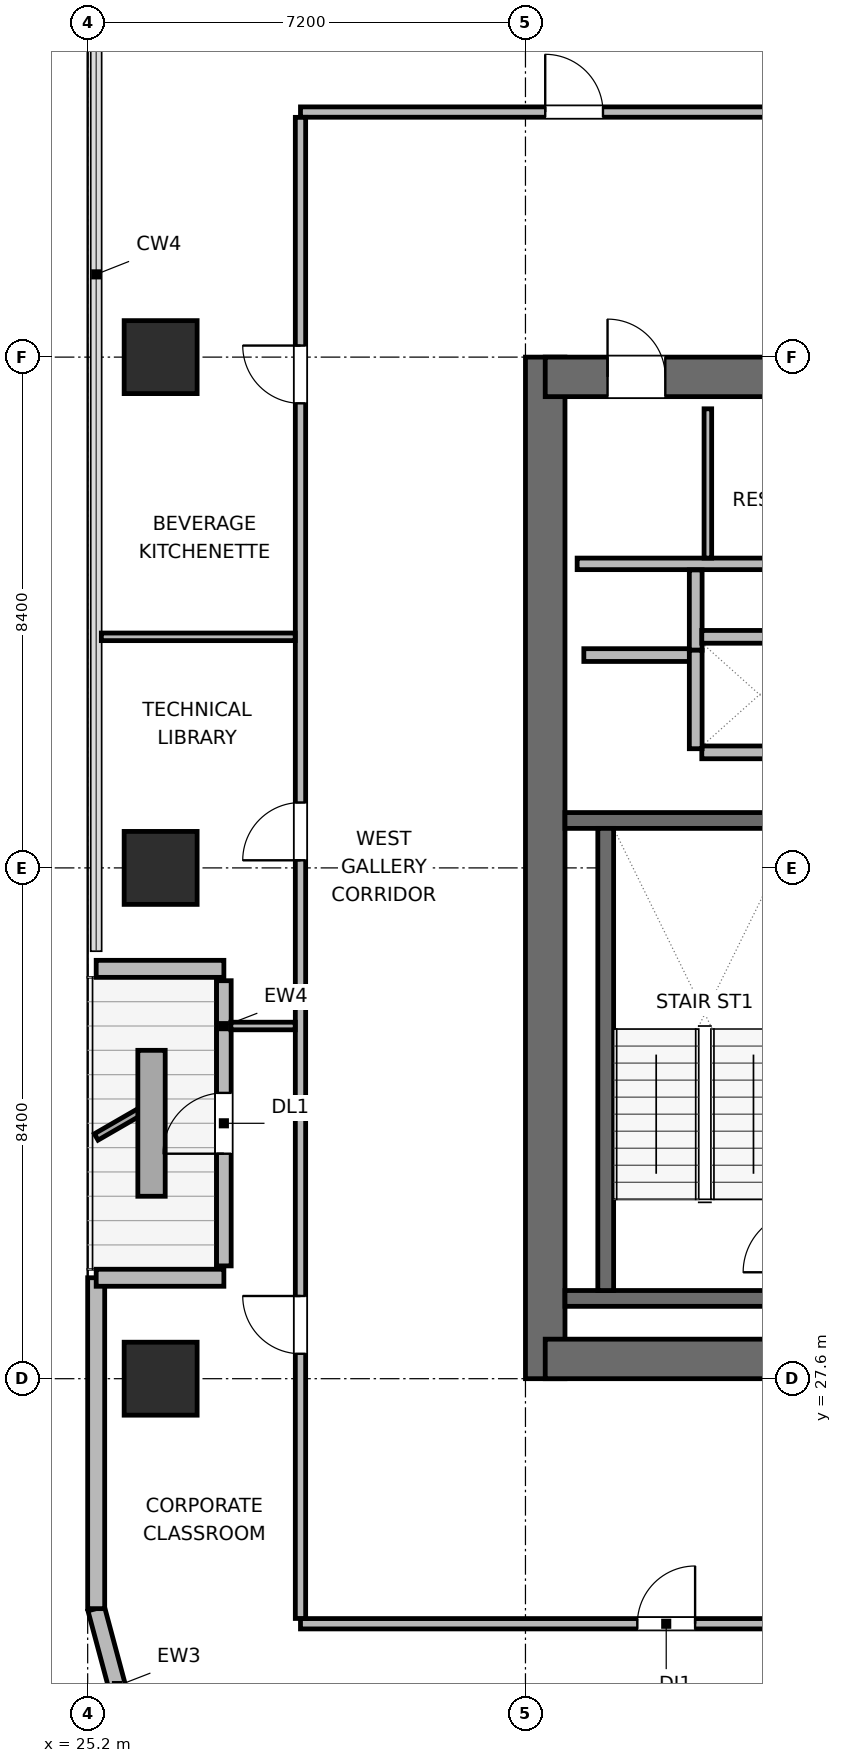
"""IFC4 building model, lengths in metres.
Left out: names, types, materials, properties, quantities, classifications, styles, units other than length and angle.
Written with IfcOpenShell. Run it as: python <this file> out.ifc"""

import sys

from ifc_helpers import new_model, si_unit, direction, frame, frame_2d, origin, origin_2d, place, context, subcontext, project, spatial, rectangle, extrude, element, fill, save


model = new_model("IFC4")
c1 = context("Model", 3, precision=1e-05, world=origin(), true_north=direction((0.0, 1.0)))
c2 = subcontext(c1, "Body", "Model", "MODEL_VIEW")
j1 = project(units=[si_unit("LENGTHUNIT", "METRE"), si_unit("PLANEANGLEUNIT", "RADIAN")], contexts=[c1])
p1 = place(None, origin())
s1 = spatial("IfcSite", under=j1, at=p1, CompositionType="ELEMENT")
p2 = place(p1, origin())
s2 = spatial("IfcBuilding", under=s1, at=p2, CompositionType="ELEMENT")
p3 = place(p2, frame((0.0, 0.0, 219.3)))
s3 = spatial("IfcBuildingStorey", under=s2, at=p3, CompositionType="ELEMENT", Elevation=219.3)
p4 = place(p3, frame((32.725, 27.6, 0.0), z_axis=(0.0, 0.0, 1.0), x_axis=(0.0, 1.0, 0.0)))
e1 = element("IfcWall", 1, at=p4, inside=s3, PredefinedType="SHEAR", context=c2, shape_type="SweptSolid", body=[
    extrude(rectangle(XDim=16.8, YDim=0.65, at=frame_2d((8.4, 0.0))), origin(), (0.0, 0.0, 1.0), 3.9),
])
p5 = place(p3, frame((32.725, 27.925, 0.0), z_axis=(0.0, 0.0, 1.0), x_axis=(1.0, 0.0, 0.0)))
e2 = element("IfcWall", 2, at=p5, inside=s3, PredefinedType="SHEAR", context=c2, shape_type="SweptSolid", body=[
    extrude(rectangle(XDim=9.35, YDim=0.65, at=frame_2d((4.675, 0.0))), origin(), (0.0, 0.0, 1.0), 3.9),
])
p6 = place(p5, frame((5.025, 0.0, 0.0)))
e3 = element("IfcOpeningElement", 3, at=p6, cuts=e2, PredefinedType="OPENING", context=c2, shape_type="SweptSolid", body=[
    extrude(rectangle(XDim=1.05, YDim=2.04, at=frame_2d((0.525, 1.02))), frame((0.0, 0.335, 0.0), z_axis=(0.0, -1.0, 0.0), x_axis=(1.0, 0.0, 0.0)), (0.0, 0.0, 1.0), 0.67),
])
p7 = place(p3, frame((32.725, 44.075, 0.0), z_axis=(0.0, 0.0, 1.0), x_axis=(1.0, 0.0, 0.0)))
e4 = element("IfcWall", 4, at=p7, inside=s3, PredefinedType="SHEAR", context=c2, shape_type="SweptSolid", body=[
    extrude(rectangle(XDim=9.35, YDim=0.65, at=frame_2d((4.675, 0.0))), origin(), (0.0, 0.0, 1.0), 3.9),
])
p8 = place(p7, frame((1.025, 0.0, 0.0)))
e5 = element("IfcOpeningElement", 5, at=p8, cuts=e4, PredefinedType="OPENING", context=c2, shape_type="SweptSolid", body=[
    extrude(rectangle(XDim=0.95, YDim=2.04, at=frame_2d((0.475, 1.02))), frame((0.0, 0.335, 0.0), z_axis=(0.0, -1.0, 0.0), x_axis=(1.0, 0.0, 0.0)), (0.0, 0.0, 1.0), 0.67),
])
p9 = place(p7, frame((4.275, 0.0, 0.0)))
e6 = element("IfcOpeningElement", 6, at=p9, cuts=e4, PredefinedType="OPENING", context=c2, shape_type="SweptSolid", body=[
    extrude(rectangle(XDim=0.9, YDim=2.02, at=frame_2d((0.45, 1.01))), frame((0.0, 0.335, 0.0), z_axis=(0.0, -1.0, 0.0), x_axis=(1.0, 0.0, 0.0)), (0.0, 0.0, 1.0), 0.67),
])
p10 = place(p7, frame((7.175, 0.0, 0.0)))
e7 = element("IfcOpeningElement", 7, at=p10, cuts=e4, PredefinedType="OPENING", context=c2, shape_type="SweptSolid", body=[
    extrude(rectangle(XDim=0.9, YDim=2.02, at=frame_2d((0.45, 1.01))), frame((0.0, 0.335, 0.0), z_axis=(0.0, -1.0, 0.0), x_axis=(1.0, 0.0, 0.0)), (0.0, 0.0, 1.0), 0.67),
])
for number, where, z_axis, x_axis in (
    (8, (33.05, 28.92, 0.0), (0.0, 0.0, 1.0), (1.0, 0.0, 0.0)),
    (9, (33.05, 36.78, 0.0), (0.0, 0.0, 1.0), (1.0, 0.0, 0.0)),
):
    element("IfcWall", number, at=place(p3, frame(where, z_axis=z_axis, x_axis=x_axis)), inside=s3, PredefinedType="SHEAR", context=c2, shape_type="SweptSolid", body=[
        extrude(rectangle(XDim=4.06, YDim=0.26, at=frame_2d((2.03, 0.0))), origin(), (0.0, 0.0, 1.0), 3.9),
    ])
p11 = place(p3, frame((33.72, 29.05, 0.0), z_axis=(0.0, 0.0, 1.0), x_axis=(0.0, 1.0, 0.0)))
e10 = element("IfcWall", 10, at=p11, inside=s3, PredefinedType="SHEAR", context=c2, shape_type="SweptSolid", body=[
    extrude(rectangle(XDim=7.6, YDim=0.26, at=frame_2d((3.8, 0.0))), origin(), (0.0, 0.0, 1.0), 3.9),
])
for number, where, z_axis, x_axis in (
    (11, (26.4, 27.6, 0.0), (0.0, 0.0, 1.0), (1.0, 0.0, 0.0)),
    (12, (26.4, 36.0, 0.0), (0.0, 0.0, 1.0), (1.0, 0.0, 0.0)),
    (13, (26.4, 44.4, 0.0), (0.0, 0.0, 1.0), (1.0, 0.0, 0.0)),
):
    element("IfcColumn", number, at=place(p3, frame(where, z_axis=z_axis, x_axis=x_axis)), inside=s3, PredefinedType="COLUMN", context=c2, shape_type="SweptSolid", body=[
        extrude(rectangle(XDim=1.2, YDim=1.2, at=origin_2d()), origin(), (0.0, 0.0, 1.0), 3.9),
    ])
p12 = place(p3, frame((26.022, 21.272, 0.0), z_axis=(0.0, 0.0, 1.0), x_axis=(-0.2588904131, 0.965906700466, 0.0)))
e14 = element("IfcWall", 14, at=p12, inside=s3, PredefinedType="SOLIDWALL", context=c2, shape_type="SweptSolid", body=[
    extrude(rectangle(XDim=2.636, YDim=0.28, at=frame_2d((1.318, 0.0))), origin(), (0.0, 0.0, 1.0), 3.68),
])
p13 = place(p3, frame((25.34, 23.818, 0.0), z_axis=(0.0, 0.0, 1.0), x_axis=(0.0, 1.0, 0.0)))
e15 = element("IfcWall", 15, at=p13, inside=s3, PredefinedType="SOLIDWALL", context=c2, shape_type="SweptSolid", body=[
    extrude(rectangle(XDim=5.442, YDim=0.28, at=frame_2d((2.721, 0.0))), origin(), (0.0, 0.0, 1.0), 3.68),
])
p14 = place(p3, frame((25.34, 29.26, 0.0), z_axis=(0.0, 0.0, 1.0), x_axis=(1.0, 0.0, 0.0)))
e16 = element("IfcWall", 16, at=p14, inside=s3, PredefinedType="SOLIDWALL", context=c2, shape_type="SweptSolid", body=[
    extrude(rectangle(XDim=2.1, YDim=0.28, at=frame_2d((1.05, 0.0))), origin(), (0.0, 0.0, 1.0), 3.116),
])
p15 = place(p3, frame((27.44, 29.455, 0.0), z_axis=(0.0, 0.0, 1.0), x_axis=(0.0, 1.0, 0.0)))
e17 = element("IfcWall", 17, at=p15, inside=s3, PredefinedType="SOLIDWALL", context=c2, shape_type="SweptSolid", body=[
    extrude(rectangle(XDim=4.69, YDim=0.24, at=frame_2d((2.345, 0.0))), origin(), (0.0, 0.0, 1.0), 3.248),
])
p16 = place(p15, frame((1.845, 0.0, 0.0)))
e18 = element("IfcOpeningElement", 18, at=p16, cuts=e17, PredefinedType="OPENING", context=c2, shape_type="SweptSolid", body=[
    extrude(rectangle(XDim=1.0, YDim=2.02, at=frame_2d((0.5, 1.01))), frame((0.0, 0.13, 0.0), z_axis=(0.0, -1.0, 0.0), x_axis=(1.0, 0.0, 0.0)), (0.0, 0.0, 1.0), 0.26),
])
p17 = place(p3, frame((27.44, 34.34, 0.0), z_axis=(0.0, 0.0, 1.0), x_axis=(-1.0, 0.0, 0.0)))
e19 = element("IfcWall", 19, at=p17, inside=s3, PredefinedType="SOLIDWALL", context=c2, shape_type="SweptSolid", body=[
    extrude(rectangle(XDim=2.1, YDim=0.28, at=frame_2d((1.05, 0.0))), origin(), (0.0, 0.0, 1.0), 3.116),
])
p18 = place(p3, frame((33.25, 41.0, 0.0), z_axis=(0.0, 0.0, 1.0), x_axis=(1.0, 0.0, 0.0)))
e20 = element("IfcWall", 20, at=p18, inside=s3, PredefinedType="PLUMBINGWALL", context=c2, shape_type="SweptSolid", body=[
    extrude(rectangle(XDim=8.3, YDim=0.19, at=frame_2d((4.15, 0.0))), origin(), (0.0, 0.0, 1.0), 3.68),
])
p19 = place(p3, frame((35.4, 41.095, 0.0), z_axis=(0.0, 0.0, 1.0), x_axis=(0.0, 1.0, 0.0)))
e21 = element("IfcWall", 21, at=p19, inside=s3, PredefinedType="PARTITIONING", context=c2, shape_type="SweptSolid", body=[
    extrude(rectangle(XDim=2.455, YDim=0.125, at=frame_2d((1.228, 0.0))), origin(), (0.0, 0.0, 1.0), 3.68),
])
p20 = place(p3, frame((33.36, 39.5, 0.0), z_axis=(0.0, 0.0, 1.0), x_axis=(1.0, 0.0, 0.0)))
e22 = element("IfcWall", 22, at=p20, inside=s3, PredefinedType="PARTITIONING", context=c2, shape_type="SweptSolid", body=[
    extrude(rectangle(XDim=1.86, YDim=0.21, at=frame_2d((0.93, 0.0))), origin(), (0.0, 0.0, 1.0), 3.68),
])
p21 = place(p3, frame((35.2, 39.58, 0.0), z_axis=(0.0, 0.0, 1.0), x_axis=(0.0, 1.0, 0.0)))
e23 = element("IfcWall", 23, at=p21, inside=s3, PredefinedType="PARTITIONING", context=c2, shape_type="SweptSolid", body=[
    extrude(rectangle(XDim=1.32, YDim=0.21, at=frame_2d((0.66, 0.0))), origin(), (0.0, 0.0, 1.0), 3.68),
])
for number, where, z_axis, x_axis in (
    (24, (35.3, 37.9, 0.0), (0.0, 0.0, 1.0), (1.0, 0.0, 0.0)),
    (25, (35.3, 39.8, 0.0), (0.0, 0.0, 1.0), (1.0, 0.0, 0.0)),
):
    element("IfcWall", number, at=place(p3, frame(where, z_axis=z_axis, x_axis=x_axis)), inside=s3, PredefinedType="PARTITIONING", context=c2, shape_type="SweptSolid", body=[
        extrude(rectangle(XDim=1.9, YDim=0.21, at=frame_2d((0.95, 0.0))), origin(), (0.0, 0.0, 1.0), 3.68),
    ])
p22 = place(p3, frame((35.2, 37.96, 0.0), z_axis=(0.0, 0.0, 1.0), x_axis=(0.0, 1.0, 0.0)))
e26 = element("IfcWall", 26, at=p22, inside=s3, PredefinedType="PARTITIONING", context=c2, shape_type="SweptSolid", body=[
    extrude(rectangle(XDim=1.62, YDim=0.21, at=frame_2d((0.81, 0.0))), origin(), (0.0, 0.0, 1.0), 3.68),
])
p23 = place(p3, frame((28.7, 23.57, 0.0), z_axis=(0.0, 0.0, 1.0), x_axis=(1.0, 0.0, 0.0)))
e27 = element("IfcWall", 27, at=p23, inside=s3, PredefinedType="PARTITIONING", context=c2, shape_type="SweptSolid", body=[
    extrude(rectangle(XDim=34.9, YDim=0.17, at=frame_2d((17.45, 0.0))), origin(), (0.0, 0.0, 1.0), 3.68),
])
p24 = place(p23, frame((5.54, 0.0, 0.0)))
e28 = element("IfcOpeningElement", 28, at=p24, cuts=e27, PredefinedType="OPENING", context=c2, shape_type="SweptSolid", body=[
    extrude(rectangle(XDim=0.95, YDim=2.04, at=frame_2d((0.475, 1.02))), frame((0.0, 0.095, 0.0), z_axis=(0.0, -1.0, 0.0), x_axis=(1.0, 0.0, 0.0)), (0.0, 0.0, 1.0), 0.19),
])
p25 = place(p23, frame((16.975, 0.0, 0.0)))
e29 = element("IfcOpeningElement", 29, at=p25, cuts=e27, PredefinedType="OPENING", context=c2, shape_type="SweptSolid", body=[
    extrude(rectangle(XDim=0.95, YDim=2.04, at=frame_2d((0.475, 1.02))), frame((0.0, 0.095, 0.0), z_axis=(0.0, -1.0, 0.0), x_axis=(1.0, 0.0, 0.0)), (0.0, 0.0, 1.0), 0.19),
])
p26 = place(p23, frame((28.41, 0.0, 0.0)))
e30 = element("IfcOpeningElement", 30, at=p26, cuts=e27, PredefinedType="OPENING", context=c2, shape_type="SweptSolid", body=[
    extrude(rectangle(XDim=0.95, YDim=2.04, at=frame_2d((0.475, 1.02))), frame((0.0, 0.095, 0.0), z_axis=(0.0, -1.0, 0.0), x_axis=(1.0, 0.0, 0.0)), (0.0, 0.0, 1.0), 0.19),
])
p27 = place(p3, frame((28.7, 48.43, 0.0), z_axis=(0.0, 0.0, 1.0), x_axis=(1.0, 0.0, 0.0)))
e31 = element("IfcWall", 31, at=p27, inside=s3, PredefinedType="PARTITIONING", context=c2, shape_type="SweptSolid", body=[
    extrude(rectangle(XDim=34.9, YDim=0.17, at=frame_2d((17.45, 0.0))), origin(), (0.0, 0.0, 1.0), 3.68),
])
p28 = place(p27, frame((4.025, 0.0, 0.0)))
e32 = element("IfcOpeningElement", 32, at=p28, cuts=e31, PredefinedType="OPENING", context=c2, shape_type="SweptSolid", body=[
    extrude(rectangle(XDim=0.95, YDim=2.04, at=frame_2d((0.475, 1.02))), frame((0.0, 0.095, 0.0), z_axis=(0.0, -1.0, 0.0), x_axis=(1.0, 0.0, 0.0)), (0.0, 0.0, 1.0), 0.19),
])
p29 = place(p27, frame((9.96, 0.0, 0.0)))
e33 = element("IfcOpeningElement", 33, at=p29, cuts=e31, PredefinedType="OPENING", context=c2, shape_type="SweptSolid", body=[
    extrude(rectangle(XDim=0.95, YDim=2.04, at=frame_2d((0.475, 1.02))), frame((0.0, 0.095, 0.0), z_axis=(0.0, -1.0, 0.0), x_axis=(1.0, 0.0, 0.0)), (0.0, 0.0, 1.0), 0.19),
])
p30 = place(p27, frame((15.94, 0.0, 0.0)))
e34 = element("IfcOpeningElement", 34, at=p30, cuts=e31, PredefinedType="OPENING", context=c2, shape_type="SweptSolid", body=[
    extrude(rectangle(XDim=0.95, YDim=2.04, at=frame_2d((0.475, 1.02))), frame((0.0, 0.095, 0.0), z_axis=(0.0, -1.0, 0.0), x_axis=(1.0, 0.0, 0.0)), (0.0, 0.0, 1.0), 0.19),
])
p31 = place(p27, frame((23.35, 0.0, 0.0)))
e35 = element("IfcOpeningElement", 35, at=p31, cuts=e31, PredefinedType="OPENING", context=c2, shape_type="SweptSolid", body=[
    extrude(rectangle(XDim=0.95, YDim=2.04, at=frame_2d((0.475, 1.02))), frame((0.0, 0.095, 0.0), z_axis=(0.0, -1.0, 0.0), x_axis=(1.0, 0.0, 0.0)), (0.0, 0.0, 1.0), 0.19),
])
p32 = place(p27, frame((30.32, 0.0, 0.0)))
e36 = element("IfcOpeningElement", 36, at=p32, cuts=e31, PredefinedType="OPENING", context=c2, shape_type="SweptSolid", body=[
    extrude(rectangle(XDim=0.95, YDim=2.04, at=frame_2d((0.475, 1.02))), frame((0.0, 0.095, 0.0), z_axis=(0.0, -1.0, 0.0), x_axis=(1.0, 0.0, 0.0)), (0.0, 0.0, 1.0), 0.19),
])
p33 = place(p3, frame((28.7, 23.657, 0.0), z_axis=(0.0, 0.0, 1.0), x_axis=(0.0, 1.0, 0.0)))
e37 = element("IfcWall", 37, at=p33, inside=s3, PredefinedType="PARTITIONING", context=c2, shape_type="SweptSolid", body=[
    extrude(rectangle(XDim=24.686, YDim=0.17, at=frame_2d((12.343, 0.0))), origin(), (0.0, 0.0, 1.0), 3.68),
])
p34 = place(p33, frame((4.353, 0.0, 0.0)))
e38 = element("IfcOpeningElement", 38, at=p34, cuts=e37, PredefinedType="OPENING", context=c2, shape_type="SweptSolid", body=[
    extrude(rectangle(XDim=0.95, YDim=2.04, at=frame_2d((0.475, 1.02))), frame((0.0, 0.095, 0.0), z_axis=(0.0, -1.0, 0.0), x_axis=(1.0, 0.0, 0.0)), (0.0, 0.0, 1.0), 0.19),
])
p35 = place(p33, frame((12.468, 0.0, 0.0)))
e39 = element("IfcOpeningElement", 39, at=p35, cuts=e37, PredefinedType="OPENING", context=c2, shape_type="SweptSolid", body=[
    extrude(rectangle(XDim=0.95, YDim=2.04, at=frame_2d((0.475, 1.02))), frame((0.0, 0.095, 0.0), z_axis=(0.0, -1.0, 0.0), x_axis=(1.0, 0.0, 0.0)), (0.0, 0.0, 1.0), 0.19),
])
p36 = place(p33, frame((19.983, 0.0, 0.0)))
e40 = element("IfcOpeningElement", 40, at=p36, cuts=e37, PredefinedType="OPENING", context=c2, shape_type="SweptSolid", body=[
    extrude(rectangle(XDim=0.95, YDim=2.04, at=frame_2d((0.475, 1.02))), frame((0.0, 0.095, 0.0), z_axis=(0.0, -1.0, 0.0), x_axis=(1.0, 0.0, 0.0)), (0.0, 0.0, 1.0), 0.19),
])
p37 = place(p3, frame((27.555, 33.4, 0.0), z_axis=(0.0, 0.0, 1.0), x_axis=(1.0, 0.0, 0.0)))
e41 = element("IfcWall", 41, at=p37, inside=s3, PredefinedType="PARTITIONING", context=c2, shape_type="SweptSolid", body=[
    extrude(rectangle(XDim=1.058, YDim=0.125, at=frame_2d((0.529, 0.0))), origin(), (0.0, 0.0, 1.0), 3.68),
])
p38 = place(p3, frame((25.425, 39.8, 0.0), z_axis=(0.0, 0.0, 1.0), x_axis=(1.0, 0.0, 0.0)))
e42 = element("IfcWall", 42, at=p38, inside=s3, PredefinedType="PARTITIONING", context=c2, shape_type="SweptSolid", body=[
    extrude(rectangle(XDim=3.188, YDim=0.125, at=frame_2d((1.594, 0.0))), origin(), (0.0, 0.0, 1.0), 3.68),
])
p39 = place(p16, origin())
e43 = element("IfcDoor", 43, at=p39, inside=s3, OperationType="SINGLE_SWING_LEFT", PredefinedType="DOOR", context=c2, shape_type="SweptSolid", body=[
    extrude(rectangle(XDim=1.0, YDim=2.02, at=frame_2d((0.5, 1.01))), frame((0.0, 0.025, 0.0), z_axis=(0.0, -1.0, 0.0), x_axis=(1.0, 0.0, 0.0)), (0.0, 0.0, 1.0), 0.05),
])
fill(e18, e43)
p40 = place(p8, origin())
e44 = element("IfcDoor", 44, at=p40, inside=s3, OperationType="SINGLE_SWING_LEFT", PredefinedType="DOOR", context=c2, shape_type="SweptSolid", body=[
    extrude(rectangle(XDim=0.95, YDim=2.04, at=frame_2d((0.475, 1.02))), frame((0.0, 0.025, 0.0), z_axis=(0.0, -1.0, 0.0), x_axis=(1.0, 0.0, 0.0)), (0.0, 0.0, 1.0), 0.05),
])
fill(e5, e44)
p41 = place(p24, origin())
e45 = element("IfcDoor", 45, at=p41, inside=s3, OperationType="SINGLE_SWING_RIGHT", PredefinedType="DOOR", context=c2, shape_type="SweptSolid", body=[
    extrude(rectangle(XDim=0.95, YDim=2.04, at=frame_2d((0.475, 1.02))), frame((0.0, 0.025, 0.0), z_axis=(0.0, -1.0, 0.0), x_axis=(1.0, 0.0, 0.0)), (0.0, 0.0, 1.0), 0.05),
])
fill(e28, e45)
p42 = place(p28, origin())
e46 = element("IfcDoor", 46, at=p42, inside=s3, OperationType="SINGLE_SWING_LEFT", PredefinedType="DOOR", context=c2, shape_type="SweptSolid", body=[
    extrude(rectangle(XDim=0.95, YDim=2.04, at=frame_2d((0.475, 1.02))), frame((0.0, 0.025, 0.0), z_axis=(0.0, -1.0, 0.0), x_axis=(1.0, 0.0, 0.0)), (0.0, 0.0, 1.0), 0.05),
])
fill(e32, e46)
p43 = place(p34, origin())
e47 = element("IfcDoor", 47, at=p43, inside=s3, OperationType="SINGLE_SWING_RIGHT", PredefinedType="DOOR", context=c2, shape_type="SweptSolid", body=[
    extrude(rectangle(XDim=0.95, YDim=2.04, at=frame_2d((0.475, 1.02))), frame((0.0, 0.025, 0.0), z_axis=(0.0, -1.0, 0.0), x_axis=(1.0, 0.0, 0.0)), (0.0, 0.0, 1.0), 0.05),
])
fill(e38, e47)
p44 = place(p35, origin())
e48 = element("IfcDoor", 48, at=p44, inside=s3, OperationType="SINGLE_SWING_LEFT", PredefinedType="DOOR", context=c2, shape_type="SweptSolid", body=[
    extrude(rectangle(XDim=0.95, YDim=2.04, at=frame_2d((0.475, 1.02))), frame((0.0, 0.025, 0.0), z_axis=(0.0, -1.0, 0.0), x_axis=(1.0, 0.0, 0.0)), (0.0, 0.0, 1.0), 0.05),
])
fill(e39, e48)
p45 = place(p36, origin())
e49 = element("IfcDoor", 49, at=p45, inside=s3, OperationType="SINGLE_SWING_RIGHT", PredefinedType="DOOR", context=c2, shape_type="SweptSolid", body=[
    extrude(rectangle(XDim=0.95, YDim=2.04, at=frame_2d((0.475, 1.02))), frame((0.0, 0.025, 0.0), z_axis=(0.0, -1.0, 0.0), x_axis=(1.0, 0.0, 0.0)), (0.0, 0.0, 1.0), 0.05),
])
fill(e40, e49)
save(model, sys.argv[1])
